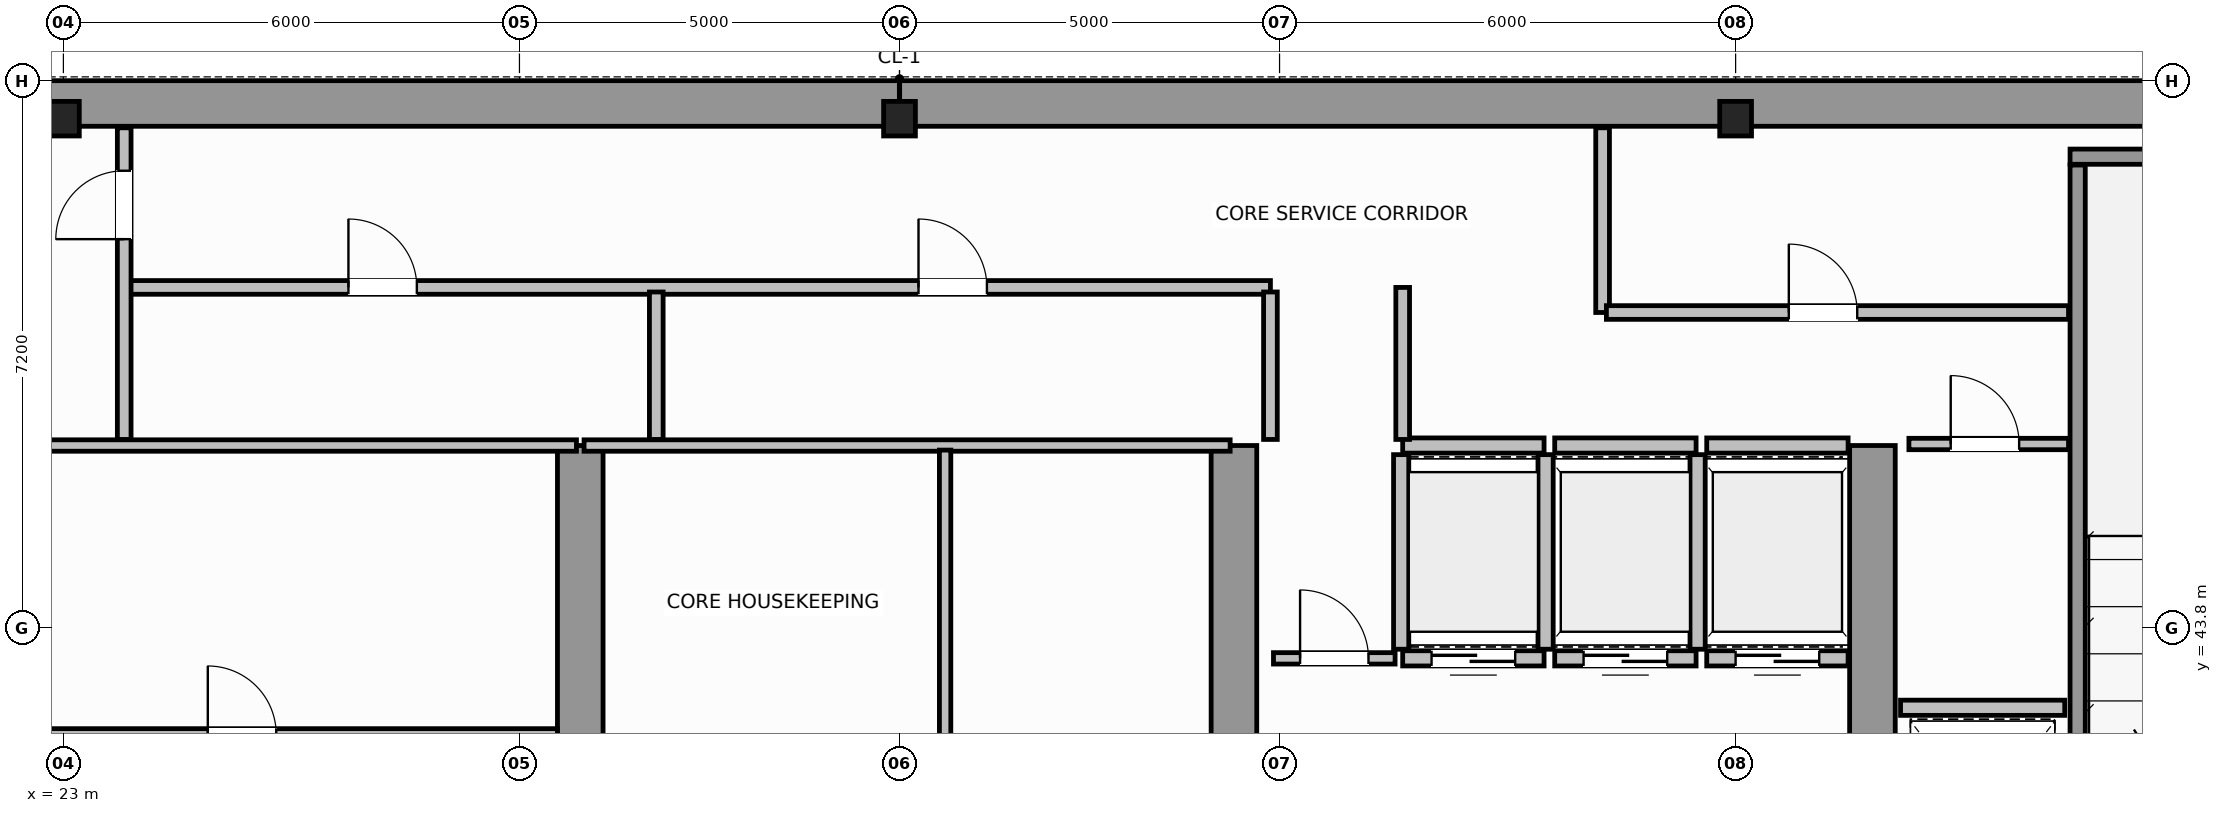
"""IFC4 building model, lengths in metres.
Left out: names, types, materials, properties, quantities, classifications, styles, units other than length and angle.
Written with IfcOpenShell. Run it as: python <this file> out.ifc"""

import sys

from ifc_helpers import new_model, si_unit, direction, frame, frame_2d, origin, origin_2d, place, context, subcontext, project, spatial, rectangle, i_section, extrude, source, transform, mapped, element, fill, save


model = new_model("IFC4")
c1 = context("Model", 3, precision=1e-05, world=origin(), true_north=direction((0.0, 1.0)))
c2 = subcontext(c1, "Body", "Model", "MODEL_VIEW")
j1 = project(units=[si_unit("LENGTHUNIT", "METRE"), si_unit("PLANEANGLEUNIT", "RADIAN")], contexts=[c1])
p1 = place(None, origin())
s1 = spatial("IfcSite", under=j1, at=p1, CompositionType="ELEMENT")
p2 = place(p1, origin())
s2 = spatial("IfcBuilding", under=s1, at=p2, CompositionType="ELEMENT")
p3 = place(p2, frame((0.0, 0.0, 214.6)))
s3 = spatial("IfcBuildingStorey", under=s2, at=p3, CompositionType="ELEMENT", Elevation=214.6)
m1 = source(origin(), c2, "Body", "SweptSolid", [
    extrude(i_section(OverallWidth=0.418, OverallDepth=0.455, WebThickness=0.042, FlangeThickness=0.058, FilletRadius=0.015, at=origin_2d()), origin(), (0.0, 0.0, 1.0), 3.8),
])
for number, where, z_axis, x_axis in (
    (1, (23.0, 50.5, 0.0), (0.0, 0.0, 1.0), (1.0, 0.0, 0.0)),
    (2, (34.0, 50.5, 0.0), (0.0, 0.0, 1.0), (1.0, 0.0, 0.0)),
    (3, (45.0, 50.5, 0.0), (0.0, 0.0, 1.0), (1.0, 0.0, 0.0)),
):
    element("IfcColumn", number, at=place(p3, frame(where, z_axis=z_axis, x_axis=x_axis)), inside=s3, PredefinedType="COLUMN", context=c2, shape_type="MappedRepresentation", body=[
        mapped(m1, transform((0.0, 0.0, 0.0), scale=1.0)),
    ])
for number, where, z_axis, x_axis in (
    (4, (14.304, 50.7, 0.0), (0.0, 0.0, 1.0), (1.0, 0.0, 0.0)),
    (5, (34.002, 50.7, 0.0), (0.0, 0.0, 1.0), (1.0, 0.0, 0.0)),
):
    element("IfcWall", number, at=place(p3, frame(where, z_axis=z_axis, x_axis=x_axis)), inside=s3, PredefinedType="SHEAR", context=c2, shape_type="SweptSolid", body=[
        extrude(rectangle(XDim=19.694, YDim=0.6, at=frame_2d((9.847, 0.0))), origin(), (0.0, 0.0, 1.0), 3.8),
    ])
for number, where, z_axis, x_axis in (
    (6, (29.8, 36.82, 0.0), (0.0, 0.0, 1.0), (0.0, 1.0, 0.0)),
    (7, (38.4, 36.82, 0.0), (0.0, 0.0, 1.0), (0.0, 1.0, 0.0)),
    (8, (46.8, 36.82, 0.0), (0.0, 0.0, 1.0), (0.0, 1.0, 0.0)),
):
    element("IfcWall", number, at=place(p3, frame(where, z_axis=z_axis, x_axis=x_axis)), inside=s3, PredefinedType="SHEAR", context=c2, shape_type="SweptSolid", body=[
        extrude(rectangle(XDim=9.38, YDim=0.6, at=frame_2d((4.69, 0.0))), origin(), (0.0, 0.0, 1.0), 3.8),
    ])
p4 = place(p3, frame((49.4, 50.0, 0.0), z_axis=(0.0, 0.0, 1.0), x_axis=(1.0, 0.0, 0.0)))
e9 = element("IfcWall", 9, at=p4, inside=s3, PredefinedType="SOLIDWALL", context=c2, shape_type="SweptSolid", body=[
    extrude(rectangle(XDim=4.3, YDim=0.2, at=frame_2d((2.15, 0.0))), origin(), (0.0, 0.0, 1.0), 3.8),
])
p5 = place(p3, frame((49.5, 39.96, 0.0), z_axis=(0.0, 0.0, 1.0), x_axis=(0.0, 1.0, 0.0)))
e10 = element("IfcWall", 10, at=p5, inside=s3, PredefinedType="SOLIDWALL", context=c2, shape_type="SweptSolid", body=[
    extrude(rectangle(XDim=9.93, YDim=0.2, at=frame_2d((4.965, 0.0))), origin(), (0.0, 0.0, 1.0), 3.8),
])
p6 = place(p3, frame((40.62, 43.4, 0.0), z_axis=(0.0, 0.0, 1.0), x_axis=(1.0, 0.0, 0.0)))
e11 = element("IfcWall", 11, at=p6, inside=s3, PredefinedType="SOLIDWALL", context=c2, shape_type="SweptSolid", body=[
    extrude(rectangle(XDim=1.86, YDim=0.2, at=frame_2d((0.93, 0.0))), origin(), (0.0, 0.0, 1.0), 3.54),
])
p7 = place(p6, frame((0.38, 0.0, 0.0)))
e12 = element("IfcOpeningElement", 12, at=p7, cuts=e11, PredefinedType="OPENING", context=c2, shape_type="SweptSolid", body=[
    extrude(rectangle(XDim=1.1, YDim=2.15, at=frame_2d((0.55, 1.075))), frame((0.0, 0.11, 0.0), z_axis=(0.0, -1.0, 0.0), x_axis=(1.0, 0.0, 0.0)), (0.0, 0.0, 1.0), 0.22),
])
p8 = place(p3, frame((40.62, 46.2, 0.0), z_axis=(0.0, 0.0, 1.0), x_axis=(1.0, 0.0, 0.0)))
e13 = element("IfcWall", 13, at=p8, inside=s3, PredefinedType="SOLIDWALL", context=c2, shape_type="SweptSolid", body=[
    extrude(rectangle(XDim=1.86, YDim=0.2, at=frame_2d((0.93, 0.0))), origin(), (0.0, 0.0, 1.0), 3.54),
])
for number, where, z_axis, x_axis in (
    (14, (40.6, 43.52, 0.0), (0.0, 0.0, 1.0), (0.0, 1.0, 0.0)),
    (15, (42.5, 43.52, 0.0), (0.0, 0.0, 1.0), (0.0, 1.0, 0.0)),
):
    element("IfcWall", number, at=place(p3, frame(where, z_axis=z_axis, x_axis=x_axis)), inside=s3, PredefinedType="SOLIDWALL", context=c2, shape_type="SweptSolid", body=[
        extrude(rectangle(XDim=2.56, YDim=0.2, at=frame_2d((1.28, 0.0))), origin(), (0.0, 0.0, 1.0), 3.54),
    ])
p9 = place(p3, frame((42.62, 43.4, 0.0), z_axis=(0.0, 0.0, 1.0), x_axis=(1.0, 0.0, 0.0)))
e16 = element("IfcWall", 16, at=p9, inside=s3, PredefinedType="SOLIDWALL", context=c2, shape_type="SweptSolid", body=[
    extrude(rectangle(XDim=1.86, YDim=0.2, at=frame_2d((0.93, 0.0))), origin(), (0.0, 0.0, 1.0), 3.54),
])
p10 = place(p9, frame((0.38, 0.0, 0.0)))
e17 = element("IfcOpeningElement", 17, at=p10, cuts=e16, PredefinedType="OPENING", context=c2, shape_type="SweptSolid", body=[
    extrude(rectangle(XDim=1.1, YDim=2.15, at=frame_2d((0.55, 1.075))), frame((0.0, 0.11, 0.0), z_axis=(0.0, -1.0, 0.0), x_axis=(1.0, 0.0, 0.0)), (0.0, 0.0, 1.0), 0.22),
])
p11 = place(p3, frame((42.62, 46.2, 0.0), z_axis=(0.0, 0.0, 1.0), x_axis=(1.0, 0.0, 0.0)))
e18 = element("IfcWall", 18, at=p11, inside=s3, PredefinedType="SOLIDWALL", context=c2, shape_type="SweptSolid", body=[
    extrude(rectangle(XDim=1.86, YDim=0.2, at=frame_2d((0.93, 0.0))), origin(), (0.0, 0.0, 1.0), 3.54),
])
p12 = place(p3, frame((44.5, 43.52, 0.0), z_axis=(0.0, 0.0, 1.0), x_axis=(0.0, 1.0, 0.0)))
e19 = element("IfcWall", 19, at=p12, inside=s3, PredefinedType="SOLIDWALL", context=c2, shape_type="SweptSolid", body=[
    extrude(rectangle(XDim=2.56, YDim=0.2, at=frame_2d((1.28, 0.0))), origin(), (0.0, 0.0, 1.0), 3.54),
])
p13 = place(p3, frame((44.62, 43.4, 0.0), z_axis=(0.0, 0.0, 1.0), x_axis=(1.0, 0.0, 0.0)))
e20 = element("IfcWall", 20, at=p13, inside=s3, PredefinedType="SOLIDWALL", context=c2, shape_type="SweptSolid", body=[
    extrude(rectangle(XDim=1.86, YDim=0.2, at=frame_2d((0.93, 0.0))), origin(), (0.0, 0.0, 1.0), 3.54),
])
p14 = place(p13, frame((0.38, 0.0, 0.0)))
e21 = element("IfcOpeningElement", 21, at=p14, cuts=e20, PredefinedType="OPENING", context=c2, shape_type="SweptSolid", body=[
    extrude(rectangle(XDim=1.1, YDim=2.15, at=frame_2d((0.55, 1.075))), frame((0.0, 0.11, 0.0), z_axis=(0.0, -1.0, 0.0), x_axis=(1.0, 0.0, 0.0)), (0.0, 0.0, 1.0), 0.22),
])
p15 = place(p3, frame((44.62, 46.2, 0.0), z_axis=(0.0, 0.0, 1.0), x_axis=(1.0, 0.0, 0.0)))
e22 = element("IfcWall", 22, at=p15, inside=s3, PredefinedType="SOLIDWALL", context=c2, shape_type="SweptSolid", body=[
    extrude(rectangle(XDim=1.86, YDim=0.2, at=frame_2d((0.93, 0.0))), origin(), (0.0, 0.0, 1.0), 3.54),
])
p16 = place(p3, frame((47.17, 42.75, 0.0), z_axis=(0.0, 0.0, 1.0), x_axis=(1.0, 0.0, 0.0)))
e23 = element("IfcWall", 23, at=p16, inside=s3, PredefinedType="SOLIDWALL", context=c2, shape_type="SweptSolid", body=[
    extrude(rectangle(XDim=2.16, YDim=0.2, at=frame_2d((1.08, 0.0))), origin(), (0.0, 0.0, 1.0), 3.54),
])
p17 = place(p3, frame((21.25, 46.2, 0.0), z_axis=(0.0, 0.0, 1.0), x_axis=(1.0, 0.0, 0.0)))
e24 = element("IfcWall", 24, at=p17, inside=s3, PredefinedType="PARTITIONING", context=c2, shape_type="SweptSolid", body=[
    extrude(rectangle(XDim=8.5, YDim=0.15, at=frame_2d((4.25, 0.0))), origin(), (0.0, 0.0, 1.0), 3.54),
])
p18 = place(p3, frame((21.5, 42.4, 0.0), z_axis=(0.0, 0.0, 1.0), x_axis=(1.0, 0.0, 0.0)))
e25 = element("IfcWall", 25, at=p18, inside=s3, PredefinedType="PARTITIONING", context=c2, shape_type="SweptSolid", body=[
    extrude(rectangle(XDim=8.0, YDim=0.15, at=frame_2d((4.0, 0.0))), origin(), (0.0, 0.0, 1.0), 3.54),
])
p19 = place(p18, frame((3.4, 0.0, 0.0)))
e26 = element("IfcOpeningElement", 26, at=p19, cuts=e25, PredefinedType="OPENING", context=c2, shape_type="SweptSolid", body=[
    extrude(rectangle(XDim=0.9, YDim=2.1, at=frame_2d((0.45, 1.05))), frame((0.0, 0.085, 0.0), z_axis=(0.0, -1.0, 0.0), x_axis=(1.0, 0.0, 0.0)), (0.0, 0.0, 1.0), 0.17),
])
p20 = place(p3, frame((29.85, 46.2, 0.0), z_axis=(0.0, 0.0, 1.0), x_axis=(1.0, 0.0, 0.0)))
e27 = element("IfcWall", 27, at=p20, inside=s3, PredefinedType="PARTITIONING", context=c2, shape_type="SweptSolid", body=[
    extrude(rectangle(XDim=8.5, YDim=0.15, at=frame_2d((4.25, 0.0))), origin(), (0.0, 0.0, 1.0), 3.54),
])
p21 = place(p3, frame((34.6, 36.56, 0.0), z_axis=(0.0, 0.0, 1.0), x_axis=(0.0, 1.0, 0.0)))
e28 = element("IfcWall", 28, at=p21, inside=s3, PredefinedType="PARTITIONING", context=c2, shape_type="SweptSolid", body=[
    extrude(rectangle(XDim=9.58, YDim=0.15, at=frame_2d((4.79, 0.0))), origin(), (0.0, 0.0, 1.0), 3.54),
])
p22 = place(p21, frame((4.2, 0.0, 0.0)))
e29 = element("IfcOpeningElement", 29, at=p22, cuts=e28, PredefinedType="OPENING", context=c2, shape_type="SweptSolid", body=[
    extrude(rectangle(XDim=0.9, YDim=2.1, at=frame_2d((0.45, 1.05))), frame((0.0, 0.085, 0.0), z_axis=(0.0, -1.0, 0.0), x_axis=(1.0, 0.0, 0.0)), (0.0, 0.0, 1.0), 0.17),
])
p23 = place(p3, frame((47.28, 46.22, 0.0), z_axis=(0.0, 0.0, 1.0), x_axis=(1.0, 0.0, 0.0)))
e30 = element("IfcWall", 30, at=p23, inside=s3, PredefinedType="PARTITIONING", context=c2, shape_type="SweptSolid", body=[
    extrude(rectangle(XDim=2.1, YDim=0.15, at=frame_2d((1.05, 0.0))), origin(), (0.0, 0.0, 1.0), 3.54),
])
p24 = place(p23, frame((0.55, 0.0, 0.0)))
e31 = element("IfcOpeningElement", 31, at=p24, cuts=e30, PredefinedType="OPENING", context=c2, shape_type="SweptSolid", body=[
    extrude(rectangle(XDim=0.9, YDim=2.1, at=frame_2d((0.45, 1.05))), frame((0.0, 0.085, 0.0), z_axis=(0.0, -1.0, 0.0), x_axis=(1.0, 0.0, 0.0)), (0.0, 0.0, 1.0), 0.17),
])
p25 = place(p3, frame((38.92, 43.4, 0.0), z_axis=(0.0, 0.0, 1.0), x_axis=(1.0, 0.0, 0.0)))
e32 = element("IfcWall", 32, at=p25, inside=s3, PredefinedType="PARTITIONING", context=c2, shape_type="SweptSolid", body=[
    extrude(rectangle(XDim=1.6, YDim=0.15, at=frame_2d((0.8, 0.0))), origin(), (0.0, 0.0, 1.0), 3.54),
])
p26 = place(p25, frame((0.35, 0.0, 0.0)))
e33 = element("IfcOpeningElement", 33, at=p26, cuts=e32, PredefinedType="OPENING", context=c2, shape_type="SweptSolid", body=[
    extrude(rectangle(XDim=0.9, YDim=2.1, at=frame_2d((0.45, 1.05))), frame((0.0, 0.085, 0.0), z_axis=(0.0, -1.0, 0.0), x_axis=(1.0, 0.0, 0.0)), (0.0, 0.0, 1.0), 0.17),
])
p27 = place(p3, frame((23.85, 48.28, 0.0), z_axis=(0.0, 0.0, 1.0), x_axis=(1.0, 0.0, 0.0)))
e34 = element("IfcWall", 34, at=p27, inside=s3, PredefinedType="PLUMBINGWALL", context=c2, shape_type="SweptSolid", body=[
    extrude(rectangle(XDim=15.03, YDim=0.18, at=frame_2d((7.515, 0.0))), origin(), (0.0, 0.0, 1.0), 3.54),
])
p28 = place(p27, frame((2.9, 0.0, 0.0)))
e35 = element("IfcOpeningElement", 35, at=p28, cuts=e34, PredefinedType="OPENING", context=c2, shape_type="SweptSolid", body=[
    extrude(rectangle(XDim=0.9, YDim=2.15, at=frame_2d((0.45, 1.075))), frame((0.0, 0.1, 0.0), z_axis=(0.0, -1.0, 0.0), x_axis=(1.0, 0.0, 0.0)), (0.0, 0.0, 1.0), 0.2),
])
p29 = place(p27, frame((10.4, 0.0, 0.0)))
e36 = element("IfcOpeningElement", 36, at=p29, cuts=e34, PredefinedType="OPENING", context=c2, shape_type="SweptSolid", body=[
    extrude(rectangle(XDim=0.9, YDim=2.15, at=frame_2d((0.45, 1.075))), frame((0.0, 0.1, 0.0), z_axis=(0.0, -1.0, 0.0), x_axis=(1.0, 0.0, 0.0)), (0.0, 0.0, 1.0), 0.2),
])
p30 = place(p3, frame((23.8, 46.28, 0.0), z_axis=(0.0, 0.0, 1.0), x_axis=(0.0, 1.0, 0.0)))
e37 = element("IfcWall", 37, at=p30, inside=s3, PredefinedType="PLUMBINGWALL", context=c2, shape_type="SweptSolid", body=[
    extrude(rectangle(XDim=4.1, YDim=0.18, at=frame_2d((2.05, 0.0))), origin(), (0.0, 0.0, 1.0), 3.54),
])
p31 = place(p30, frame((2.635, 0.0, 0.0)))
e38 = element("IfcOpeningElement", 38, at=p31, cuts=e37, PredefinedType="OPENING", context=c2, shape_type="SweptSolid", body=[
    extrude(rectangle(XDim=0.9, YDim=2.15, at=frame_2d((0.45, 1.075))), frame((0.0, 0.1, 0.0), z_axis=(0.0, -1.0, 0.0), x_axis=(1.0, 0.0, 0.0)), (0.0, 0.0, 1.0), 0.2),
])
for number, where, z_axis, x_axis in (
    (39, (30.8, 46.28, 0.0), (0.0, 0.0, 1.0), (0.0, 1.0, 0.0)),
    (40, (38.88, 46.28, 0.0), (0.0, 0.0, 1.0), (0.0, 1.0, 0.0)),
):
    element("IfcWall", number, at=place(p3, frame(where, z_axis=z_axis, x_axis=x_axis)), inside=s3, PredefinedType="PLUMBINGWALL", context=c2, shape_type="SweptSolid", body=[
        extrude(rectangle(XDim=1.94, YDim=0.18, at=frame_2d((0.97, 0.0))), origin(), (0.0, 0.0, 1.0), 3.54),
    ])
p32 = place(p3, frame((40.62, 46.28, 0.0), z_axis=(0.0, 0.0, 1.0), x_axis=(0.0, 1.0, 0.0)))
e41 = element("IfcWall", 41, at=p32, inside=s3, PredefinedType="PLUMBINGWALL", context=c2, shape_type="SweptSolid", body=[
    extrude(rectangle(XDim=2.0, YDim=0.18, at=frame_2d((1.0, 0.0))), origin(), (0.0, 0.0, 1.0), 3.54),
])
p33 = place(p3, frame((43.25, 47.95, 0.0), z_axis=(0.0, 0.0, 1.0), x_axis=(0.0, 1.0, 0.0)))
e42 = element("IfcWall", 42, at=p33, inside=s3, PredefinedType="PLUMBINGWALL", context=c2, shape_type="SweptSolid", body=[
    extrude(rectangle(XDim=2.43, YDim=0.18, at=frame_2d((1.215, 0.0))), origin(), (0.0, 0.0, 1.0), 3.54),
])
p34 = place(p3, frame((43.3, 47.95, 0.0), z_axis=(0.0, 0.0, 1.0), x_axis=(1.0, 0.0, 0.0)))
e43 = element("IfcWall", 43, at=p34, inside=s3, PredefinedType="PLUMBINGWALL", context=c2, shape_type="SweptSolid", body=[
    extrude(rectangle(XDim=6.08, YDim=0.18, at=frame_2d((3.04, 0.0))), origin(), (0.0, 0.0, 1.0), 3.54),
])
p35 = place(p34, frame((2.4, 0.0, 0.0)))
e44 = element("IfcOpeningElement", 44, at=p35, cuts=e43, PredefinedType="OPENING", context=c2, shape_type="SweptSolid", body=[
    extrude(rectangle(XDim=0.9, YDim=2.15, at=frame_2d((0.45, 1.075))), frame((0.0, 0.1, 0.0), z_axis=(0.0, -1.0, 0.0), x_axis=(1.0, 0.0, 0.0)), (0.0, 0.0, 1.0), 0.2),
])
m2 = source(origin(), c2, "Body", "SweptSolid", [
    extrude(rectangle(XDim=1.1, YDim=2.15, at=frame_2d((0.55, 1.075))), frame((0.0, 0.025, 0.0), z_axis=(0.0, -1.0, 0.0), x_axis=(1.0, 0.0, 0.0)), (0.0, 0.0, 1.0), 0.05),
])
p36 = place(p7, origin())
e45 = element("IfcDoor", 45, at=p36, inside=s3, OperationType="DOUBLE_DOOR_SLIDING", PredefinedType="DOOR", context=c2, shape_type="MappedRepresentation", body=[
    mapped(m2, transform((0.0, 0.0, 0.0), scale=1.0)),
])
fill(e12, e45)
p37 = place(p10, origin())
e46 = element("IfcDoor", 46, at=p37, inside=s3, OperationType="DOUBLE_DOOR_SLIDING", PredefinedType="DOOR", context=c2, shape_type="MappedRepresentation", body=[
    mapped(m2, transform((0.0, 0.0, 0.0), scale=1.0)),
])
fill(e17, e46)
p38 = place(p14, origin())
e47 = element("IfcDoor", 47, at=p38, inside=s3, OperationType="DOUBLE_DOOR_SLIDING", PredefinedType="DOOR", context=c2, shape_type="MappedRepresentation", body=[
    mapped(m2, transform((0.0, 0.0, 0.0), scale=1.0)),
])
fill(e21, e47)
m3 = source(origin(), c2, "Body", "SweptSolid", [
    extrude(rectangle(XDim=0.9, YDim=2.1, at=frame_2d((0.45, 1.05))), frame((0.0, 0.025, 0.0), z_axis=(0.0, -1.0, 0.0), x_axis=(1.0, 0.0, 0.0)), (0.0, 0.0, 1.0), 0.05),
])
p39 = place(p19, origin())
e48 = element("IfcDoor", 48, at=p39, inside=s3, OperationType="SINGLE_SWING_RIGHT", PredefinedType="DOOR", context=c2, shape_type="MappedRepresentation", body=[
    mapped(m3, transform((0.0, 0.0, 0.0), scale=1.0)),
])
fill(e26, e48)
p40 = place(p24, origin())
e49 = element("IfcDoor", 49, at=p40, inside=s3, OperationType="SINGLE_SWING_RIGHT", PredefinedType="DOOR", context=c2, shape_type="MappedRepresentation", body=[
    mapped(m3, transform((0.0, 0.0, 0.0), scale=1.0)),
])
fill(e31, e49)
p41 = place(p26, origin())
e50 = element("IfcDoor", 50, at=p41, inside=s3, OperationType="SINGLE_SWING_LEFT", PredefinedType="DOOR", context=c2, shape_type="MappedRepresentation", body=[
    mapped(m3, transform((0.0, 0.0, 0.0), scale=1.0)),
])
fill(e33, e50)
m4 = source(origin(), c2, "Body", "SweptSolid", [
    extrude(rectangle(XDim=0.9, YDim=2.15, at=frame_2d((0.45, 1.075))), frame((0.0, 0.025, 0.0), z_axis=(0.0, -1.0, 0.0), x_axis=(1.0, 0.0, 0.0)), (0.0, 0.0, 1.0), 0.05),
])
p42 = place(p31, origin())
e51 = element("IfcDoor", 51, at=p42, inside=s3, OperationType="SINGLE_SWING_LEFT", PredefinedType="DOOR", context=c2, shape_type="MappedRepresentation", body=[
    mapped(m4, transform((0.0, 0.0, 0.0), scale=1.0)),
])
fill(e38, e51)
p43 = place(p28, origin())
e52 = element("IfcDoor", 52, at=p43, inside=s3, OperationType="SINGLE_SWING_RIGHT", PredefinedType="DOOR", context=c2, shape_type="MappedRepresentation", body=[
    mapped(m4, transform((0.0, 0.0, 0.0), scale=1.0)),
])
fill(e35, e52)
p44 = place(p29, origin())
e53 = element("IfcDoor", 53, at=p44, inside=s3, OperationType="SINGLE_SWING_LEFT", PredefinedType="DOOR", context=c2, shape_type="MappedRepresentation", body=[
    mapped(m4, transform((0.0, 0.0, 0.0), scale=1.0)),
])
fill(e36, e53)
p45 = place(p35, origin())
e54 = element("IfcDoor", 54, at=p45, inside=s3, OperationType="SINGLE_SWING_RIGHT", PredefinedType="DOOR", context=c2, shape_type="MappedRepresentation", body=[
    mapped(m4, transform((0.0, 0.0, 0.0), scale=1.0)),
])
fill(e44, e54)
save(model, sys.argv[1])
